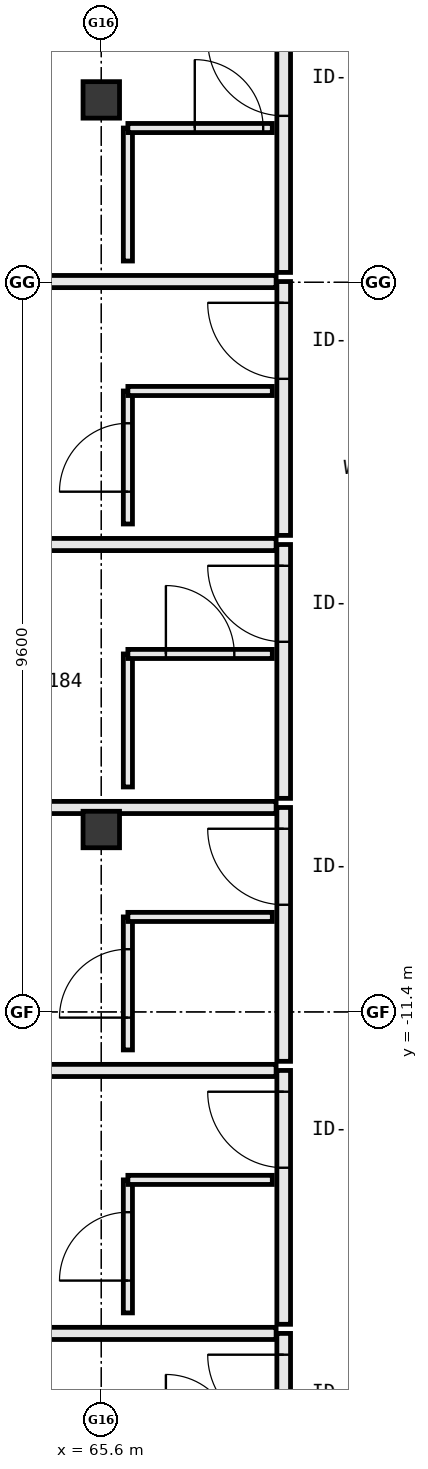
"""IFC4 building model, lengths in metres.
Left out: names, types, materials, properties, quantities, classifications, styles, units other than length and angle.
Written with IfcOpenShell. Run it as: python <this file> out.ifc"""

import sys

from ifc_helpers import new_model, si_unit, direction, frame, frame_2d, origin, origin_2d, place, context, subcontext, project, spatial, rectangle, extrude, element, fill, save


model = new_model("IFC4")
c1 = context("Model", 3, precision=1e-05, world=origin(), true_north=direction((0.0, 1.0)))
c2 = subcontext(c1, "Body", "Model", "MODEL_VIEW")
j1 = project(units=[si_unit("LENGTHUNIT", "METRE"), si_unit("PLANEANGLEUNIT", "RADIAN")], contexts=[c1])
p1 = place(None, origin())
s1 = spatial("IfcSite", under=j1, at=p1, CompositionType="ELEMENT")
p2 = place(p1, origin())
s2 = spatial("IfcBuilding", under=s1, at=p2, CompositionType="ELEMENT")
p3 = place(p2, frame((0.0, 0.0, 27.6)))
s3 = spatial("IfcBuildingStorey", under=s2, at=p3, CompositionType="ELEMENT", Elevation=27.6)
for number, where, z_axis, x_axis in (
    (1, (65.6, -9.0, 0.0), (0.0, 0.0, 1.0), (1.0, 0.0, 0.0)),
    (2, (65.6, 0.6, 0.0), (0.0, 0.0, 1.0), (1.0, 0.0, 0.0)),
):
    element("IfcColumn", number, at=place(p3, frame(where, z_axis=z_axis, x_axis=x_axis)), inside=s3, PredefinedType="COLUMN", context=c2, shape_type="SweptSolid", body=[
        extrude(rectangle(XDim=0.48, YDim=0.48, at=origin_2d()), origin(), (0.0, 0.0, 1.0), 3.8),
    ])
p4 = place(p3, frame((68.0, -18.97, 0.0), z_axis=(0.0, 0.0, 1.0), x_axis=(0.0, 1.0, 0.0)))
e3 = element("IfcWall", 3, at=p4, inside=s3, PredefinedType="PARTITIONING", context=c2, shape_type="SweptSolid", body=[
    extrude(rectangle(XDim=3.34, YDim=0.18, at=frame_2d((1.67, 0.0))), origin(), (0.0, 0.0, 1.0), 3.555),
])
p5 = place(p4, frame((2.06, 0.0, 0.0)))
e4 = element("IfcOpeningElement", 4, at=p5, cuts=e3, PredefinedType="OPENING", context=c2, shape_type="SweptSolid", body=[
    extrude(rectangle(XDim=1.0, YDim=2.2, at=frame_2d((0.5, 1.1))), frame((0.0, 0.102, 0.0), z_axis=(0.0, -1.0, 0.0), x_axis=(1.0, 0.0, 0.0)), (0.0, 0.0, 1.0), 0.204),
])
p6 = place(p3, frame((60.96, -15.63, 0.0), z_axis=(0.0, 0.0, 1.0), x_axis=(1.0, 0.0, 0.0)))
e5 = element("IfcWall", 5, at=p6, inside=s3, PredefinedType="PARTITIONING", context=c2, shape_type="SweptSolid", body=[
    extrude(rectangle(XDim=6.94, YDim=0.16, at=frame_2d((3.47, 0.0))), origin(), (0.0, 0.0, 1.0), 3.555),
])
p7 = place(p3, frame((68.0, -15.51, 0.0), z_axis=(0.0, 0.0, 1.0), x_axis=(0.0, 1.0, 0.0)))
e6 = element("IfcWall", 6, at=p7, inside=s3, PredefinedType="PARTITIONING", context=c2, shape_type="SweptSolid", body=[
    extrude(rectangle(XDim=3.34, YDim=0.18, at=frame_2d((1.67, 0.0))), origin(), (0.0, 0.0, 1.0), 3.555),
])
p8 = place(p7, frame((2.06, 0.0, 0.0)))
e7 = element("IfcOpeningElement", 7, at=p8, cuts=e6, PredefinedType="OPENING", context=c2, shape_type="SweptSolid", body=[
    extrude(rectangle(XDim=1.0, YDim=2.2, at=frame_2d((0.5, 1.1))), frame((0.0, 0.102, 0.0), z_axis=(0.0, -1.0, 0.0), x_axis=(1.0, 0.0, 0.0)), (0.0, 0.0, 1.0), 0.204),
])
p9 = place(p3, frame((60.96, -12.17, 0.0), z_axis=(0.0, 0.0, 1.0), x_axis=(1.0, 0.0, 0.0)))
e8 = element("IfcWall", 8, at=p9, inside=s3, PredefinedType="PARTITIONING", context=c2, shape_type="SweptSolid", body=[
    extrude(rectangle(XDim=6.94, YDim=0.16, at=frame_2d((3.47, 0.0))), origin(), (0.0, 0.0, 1.0), 3.555),
])
p10 = place(p3, frame((65.95, -15.36, 0.0), z_axis=(0.0, 0.0, 1.0), x_axis=(0.0, 1.0, 0.0)))
e9 = element("IfcWall", 9, at=p10, inside=s3, PredefinedType="PARTITIONING", context=c2, shape_type="SweptSolid", body=[
    extrude(rectangle(XDim=1.75, YDim=0.12, at=frame_2d((0.875, 0.0))), origin(), (0.0, 0.0, 1.0), 2.91),
])
p11 = place(p10, frame((0.425, 0.0, 0.0)))
e10 = element("IfcOpeningElement", 10, at=p11, cuts=e9, PredefinedType="OPENING", context=c2, shape_type="SweptSolid", body=[
    extrude(rectangle(XDim=0.9, YDim=2.15, at=frame_2d((0.45, 1.075))), frame((0.0, 0.072, 0.0), z_axis=(0.0, -1.0, 0.0), x_axis=(1.0, 0.0, 0.0)), (0.0, 0.0, 1.0), 0.144),
])
p12 = place(p3, frame((65.95, -13.61, 0.0), z_axis=(0.0, 0.0, 1.0), x_axis=(1.0, 0.0, 0.0)))
e11 = element("IfcWall", 11, at=p12, inside=s3, PredefinedType="PARTITIONING", context=c2, shape_type="SweptSolid", body=[
    extrude(rectangle(XDim=1.9, YDim=0.12, at=frame_2d((0.95, 0.0))), origin(), (0.0, 0.0, 1.0), 3.555),
])
p13 = place(p3, frame((68.0, -12.05, 0.0), z_axis=(0.0, 0.0, 1.0), x_axis=(0.0, 1.0, 0.0)))
e12 = element("IfcWall", 12, at=p13, inside=s3, PredefinedType="PARTITIONING", context=c2, shape_type="SweptSolid", body=[
    extrude(rectangle(XDim=3.34, YDim=0.18, at=frame_2d((1.67, 0.0))), origin(), (0.0, 0.0, 1.0), 3.555),
])
p14 = place(p13, frame((2.06, 0.0, 0.0)))
e13 = element("IfcOpeningElement", 13, at=p14, cuts=e12, PredefinedType="OPENING", context=c2, shape_type="SweptSolid", body=[
    extrude(rectangle(XDim=1.0, YDim=2.2, at=frame_2d((0.5, 1.1))), frame((0.0, 0.102, 0.0), z_axis=(0.0, -1.0, 0.0), x_axis=(1.0, 0.0, 0.0)), (0.0, 0.0, 1.0), 0.204),
])
p15 = place(p3, frame((60.96, -8.71, 0.0), z_axis=(0.0, 0.0, 1.0), x_axis=(1.0, 0.0, 0.0)))
e14 = element("IfcWall", 14, at=p15, inside=s3, PredefinedType="PARTITIONING", context=c2, shape_type="SweptSolid", body=[
    extrude(rectangle(XDim=6.94, YDim=0.16, at=frame_2d((3.47, 0.0))), origin(), (0.0, 0.0, 1.0), 3.01),
])
p16 = place(p3, frame((65.95, -11.9, 0.0), z_axis=(0.0, 0.0, 1.0), x_axis=(0.0, 1.0, 0.0)))
e15 = element("IfcWall", 15, at=p16, inside=s3, PredefinedType="PARTITIONING", context=c2, shape_type="SweptSolid", body=[
    extrude(rectangle(XDim=1.75, YDim=0.12, at=frame_2d((0.875, 0.0))), origin(), (0.0, 0.0, 1.0), 2.91),
])
p17 = place(p16, frame((0.425, 0.0, 0.0)))
e16 = element("IfcOpeningElement", 16, at=p17, cuts=e15, PredefinedType="OPENING", context=c2, shape_type="SweptSolid", body=[
    extrude(rectangle(XDim=0.9, YDim=2.15, at=frame_2d((0.45, 1.075))), frame((0.0, 0.072, 0.0), z_axis=(0.0, -1.0, 0.0), x_axis=(1.0, 0.0, 0.0)), (0.0, 0.0, 1.0), 0.144),
])
p18 = place(p3, frame((65.95, -10.15, 0.0), z_axis=(0.0, 0.0, 1.0), x_axis=(1.0, 0.0, 0.0)))
e17 = element("IfcWall", 17, at=p18, inside=s3, PredefinedType="PARTITIONING", context=c2, shape_type="SweptSolid", body=[
    extrude(rectangle(XDim=1.9, YDim=0.12, at=frame_2d((0.95, 0.0))), origin(), (0.0, 0.0, 1.0), 3.555),
])
p19 = place(p3, frame((68.0, -8.59, 0.0), z_axis=(0.0, 0.0, 1.0), x_axis=(0.0, 1.0, 0.0)))
e18 = element("IfcWall", 18, at=p19, inside=s3, PredefinedType="PARTITIONING", context=c2, shape_type="SweptSolid", body=[
    extrude(rectangle(XDim=3.34, YDim=0.18, at=frame_2d((1.67, 0.0))), origin(), (0.0, 0.0, 1.0), 3.555),
])
p20 = place(p19, frame((2.06, 0.0, 0.0)))
e19 = element("IfcOpeningElement", 19, at=p20, cuts=e18, PredefinedType="OPENING", context=c2, shape_type="SweptSolid", body=[
    extrude(rectangle(XDim=1.0, YDim=2.2, at=frame_2d((0.5, 1.1))), frame((0.0, 0.102, 0.0), z_axis=(0.0, -1.0, 0.0), x_axis=(1.0, 0.0, 0.0)), (0.0, 0.0, 1.0), 0.204),
])
p21 = place(p3, frame((60.96, -5.25, 0.0), z_axis=(0.0, 0.0, 1.0), x_axis=(1.0, 0.0, 0.0)))
e20 = element("IfcWall", 20, at=p21, inside=s3, PredefinedType="PARTITIONING", context=c2, shape_type="SweptSolid", body=[
    extrude(rectangle(XDim=6.94, YDim=0.16, at=frame_2d((3.47, 0.0))), origin(), (0.0, 0.0, 1.0), 3.555),
])
p22 = place(p3, frame((65.95, -8.44, 0.0), z_axis=(0.0, 0.0, 1.0), x_axis=(0.0, 1.0, 0.0)))
e21 = element("IfcWall", 21, at=p22, inside=s3, PredefinedType="PARTITIONING", context=c2, shape_type="SweptSolid", body=[
    extrude(rectangle(XDim=1.75, YDim=0.12, at=frame_2d((0.875, 0.0))), origin(), (0.0, 0.0, 1.0), 2.91),
])
p23 = place(p3, frame((65.95, -6.69, 0.0), z_axis=(0.0, 0.0, 1.0), x_axis=(1.0, 0.0, 0.0)))
e22 = element("IfcWall", 22, at=p23, inside=s3, PredefinedType="PARTITIONING", context=c2, shape_type="SweptSolid", body=[
    extrude(rectangle(XDim=1.9, YDim=0.12, at=frame_2d((0.95, 0.0))), origin(), (0.0, 0.0, 1.0), 3.555),
])
p24 = place(p23, frame((0.5, 0.0, 0.0)))
e23 = element("IfcOpeningElement", 23, at=p24, cuts=e22, PredefinedType="OPENING", context=c2, shape_type="SweptSolid", body=[
    extrude(rectangle(XDim=0.9, YDim=2.15, at=frame_2d((0.45, 1.075))), frame((0.0, 0.072, 0.0), z_axis=(0.0, -1.0, 0.0), x_axis=(1.0, 0.0, 0.0)), (0.0, 0.0, 1.0), 0.144),
])
p25 = place(p3, frame((68.0, -5.13, 0.0), z_axis=(0.0, 0.0, 1.0), x_axis=(0.0, 1.0, 0.0)))
e24 = element("IfcWall", 24, at=p25, inside=s3, PredefinedType="PARTITIONING", context=c2, shape_type="SweptSolid", body=[
    extrude(rectangle(XDim=3.34, YDim=0.18, at=frame_2d((1.67, 0.0))), origin(), (0.0, 0.0, 1.0), 3.555),
])
p26 = place(p25, frame((2.06, 0.0, 0.0)))
e25 = element("IfcOpeningElement", 25, at=p26, cuts=e24, PredefinedType="OPENING", context=c2, shape_type="SweptSolid", body=[
    extrude(rectangle(XDim=1.0, YDim=2.2, at=frame_2d((0.5, 1.1))), frame((0.0, 0.102, 0.0), z_axis=(0.0, -1.0, 0.0), x_axis=(1.0, 0.0, 0.0)), (0.0, 0.0, 1.0), 0.204),
])
p27 = place(p3, frame((60.96, -1.79, 0.0), z_axis=(0.0, 0.0, 1.0), x_axis=(1.0, 0.0, 0.0)))
e26 = element("IfcWall", 26, at=p27, inside=s3, PredefinedType="PARTITIONING", context=c2, shape_type="SweptSolid", body=[
    extrude(rectangle(XDim=6.94, YDim=0.16, at=frame_2d((3.47, 0.0))), origin(), (0.0, 0.0, 1.0), 3.555),
])
p28 = place(p3, frame((65.95, -4.98, 0.0), z_axis=(0.0, 0.0, 1.0), x_axis=(0.0, 1.0, 0.0)))
e27 = element("IfcWall", 27, at=p28, inside=s3, PredefinedType="PARTITIONING", context=c2, shape_type="SweptSolid", body=[
    extrude(rectangle(XDim=1.75, YDim=0.12, at=frame_2d((0.875, 0.0))), origin(), (0.0, 0.0, 1.0), 2.91),
])
p29 = place(p28, frame((0.425, 0.0, 0.0)))
e28 = element("IfcOpeningElement", 28, at=p29, cuts=e27, PredefinedType="OPENING", context=c2, shape_type="SweptSolid", body=[
    extrude(rectangle(XDim=0.9, YDim=2.15, at=frame_2d((0.45, 1.075))), frame((0.0, 0.072, 0.0), z_axis=(0.0, -1.0, 0.0), x_axis=(1.0, 0.0, 0.0)), (0.0, 0.0, 1.0), 0.144),
])
p30 = place(p3, frame((65.95, -3.23, 0.0), z_axis=(0.0, 0.0, 1.0), x_axis=(1.0, 0.0, 0.0)))
e29 = element("IfcWall", 29, at=p30, inside=s3, PredefinedType="PARTITIONING", context=c2, shape_type="SweptSolid", body=[
    extrude(rectangle(XDim=1.9, YDim=0.12, at=frame_2d((0.95, 0.0))), origin(), (0.0, 0.0, 1.0), 3.555),
])
p31 = place(p3, frame((68.0, -1.67, 0.0), z_axis=(0.0, 0.0, 1.0), x_axis=(0.0, 1.0, 0.0)))
e30 = element("IfcWall", 30, at=p31, inside=s3, PredefinedType="PARTITIONING", context=c2, shape_type="SweptSolid", body=[
    extrude(rectangle(XDim=3.34, YDim=0.18, at=frame_2d((1.67, 0.0))), origin(), (0.0, 0.0, 1.0), 3.555),
])
p32 = place(p31, frame((2.06, 0.0, 0.0)))
e31 = element("IfcOpeningElement", 31, at=p32, cuts=e30, PredefinedType="OPENING", context=c2, shape_type="SweptSolid", body=[
    extrude(rectangle(XDim=1.0, YDim=2.2, at=frame_2d((0.5, 1.1))), frame((0.0, 0.102, 0.0), z_axis=(0.0, -1.0, 0.0), x_axis=(1.0, 0.0, 0.0)), (0.0, 0.0, 1.0), 0.204),
])
p33 = place(p3, frame((65.95, -1.52, 0.0), z_axis=(0.0, 0.0, 1.0), x_axis=(0.0, 1.0, 0.0)))
e32 = element("IfcWall", 32, at=p33, inside=s3, PredefinedType="PARTITIONING", context=c2, shape_type="SweptSolid", body=[
    extrude(rectangle(XDim=1.75, YDim=0.12, at=frame_2d((0.875, 0.0))), origin(), (0.0, 0.0, 1.0), 2.91),
])
p34 = place(p3, frame((65.95, 0.23, 0.0), z_axis=(0.0, 0.0, 1.0), x_axis=(1.0, 0.0, 0.0)))
e33 = element("IfcWall", 33, at=p34, inside=s3, PredefinedType="PARTITIONING", context=c2, shape_type="SweptSolid", body=[
    extrude(rectangle(XDim=1.9, YDim=0.12, at=frame_2d((0.95, 0.0))), origin(), (0.0, 0.0, 1.0), 2.93),
])
p35 = place(p34, frame((0.88, 0.0, 0.0)))
e34 = element("IfcOpeningElement", 34, at=p35, cuts=e33, PredefinedType="OPENING", context=c2, shape_type="SweptSolid", body=[
    extrude(rectangle(XDim=0.9, YDim=2.15, at=frame_2d((0.45, 1.075))), frame((0.0, 0.072, 0.0), z_axis=(0.0, -1.0, 0.0), x_axis=(1.0, 0.0, 0.0)), (0.0, 0.0, 1.0), 0.144),
])
p36 = place(p5, origin())
e35 = element("IfcDoor", 35, at=p36, inside=s3, OperationType="SINGLE_SWING_RIGHT", PredefinedType="DOOR", context=c2, shape_type="SweptSolid", body=[
    extrude(rectangle(XDim=1.0, YDim=2.2, at=frame_2d((0.5, 1.1))), frame((0.0, 0.025, 0.0), z_axis=(0.0, -1.0, 0.0), x_axis=(1.0, 0.0, 0.0)), (0.0, 0.0, 1.0), 0.05),
])
fill(e4, e35)
p37 = place(p8, origin())
e36 = element("IfcDoor", 36, at=p37, inside=s3, OperationType="SINGLE_SWING_RIGHT", PredefinedType="DOOR", context=c2, shape_type="SweptSolid", body=[
    extrude(rectangle(XDim=1.0, YDim=2.2, at=frame_2d((0.5, 1.1))), frame((0.0, 0.025, 0.0), z_axis=(0.0, -1.0, 0.0), x_axis=(1.0, 0.0, 0.0)), (0.0, 0.0, 1.0), 0.05),
])
fill(e7, e36)
p38 = place(p11, origin())
e37 = element("IfcDoor", 37, at=p38, inside=s3, OperationType="SINGLE_SWING_LEFT", PredefinedType="DOOR", context=c2, shape_type="SweptSolid", body=[
    extrude(rectangle(XDim=0.9, YDim=2.15, at=frame_2d((0.45, 1.075))), frame((0.0, 0.025, 0.0), z_axis=(0.0, -1.0, 0.0), x_axis=(1.0, 0.0, 0.0)), (0.0, 0.0, 1.0), 0.05),
])
fill(e10, e37)
p39 = place(p14, origin())
e38 = element("IfcDoor", 38, at=p39, inside=s3, OperationType="SINGLE_SWING_RIGHT", PredefinedType="DOOR", context=c2, shape_type="SweptSolid", body=[
    extrude(rectangle(XDim=1.0, YDim=2.2, at=frame_2d((0.5, 1.1))), frame((0.0, 0.025, 0.0), z_axis=(0.0, -1.0, 0.0), x_axis=(1.0, 0.0, 0.0)), (0.0, 0.0, 1.0), 0.05),
])
fill(e13, e38)
p40 = place(p17, origin())
e39 = element("IfcDoor", 39, at=p40, inside=s3, OperationType="SINGLE_SWING_LEFT", PredefinedType="DOOR", context=c2, shape_type="SweptSolid", body=[
    extrude(rectangle(XDim=0.9, YDim=2.15, at=frame_2d((0.45, 1.075))), frame((0.0, 0.025, 0.0), z_axis=(0.0, -1.0, 0.0), x_axis=(1.0, 0.0, 0.0)), (0.0, 0.0, 1.0), 0.05),
])
fill(e16, e39)
p41 = place(p20, origin())
e40 = element("IfcDoor", 40, at=p41, inside=s3, OperationType="SINGLE_SWING_RIGHT", PredefinedType="DOOR", context=c2, shape_type="SweptSolid", body=[
    extrude(rectangle(XDim=1.0, YDim=2.2, at=frame_2d((0.5, 1.1))), frame((0.0, 0.025, 0.0), z_axis=(0.0, -1.0, 0.0), x_axis=(1.0, 0.0, 0.0)), (0.0, 0.0, 1.0), 0.05),
])
fill(e19, e40)
p42 = place(p24, origin())
e41 = element("IfcDoor", 41, at=p42, inside=s3, OperationType="SINGLE_SWING_LEFT", PredefinedType="DOOR", context=c2, shape_type="SweptSolid", body=[
    extrude(rectangle(XDim=0.9, YDim=2.15, at=frame_2d((0.45, 1.075))), frame((0.0, 0.025, 0.0), z_axis=(0.0, -1.0, 0.0), x_axis=(1.0, 0.0, 0.0)), (0.0, 0.0, 1.0), 0.05),
])
fill(e23, e41)
p43 = place(p26, origin())
e42 = element("IfcDoor", 42, at=p43, inside=s3, OperationType="SINGLE_SWING_RIGHT", PredefinedType="DOOR", context=c2, shape_type="SweptSolid", body=[
    extrude(rectangle(XDim=1.0, YDim=2.2, at=frame_2d((0.5, 1.1))), frame((0.0, 0.025, 0.0), z_axis=(0.0, -1.0, 0.0), x_axis=(1.0, 0.0, 0.0)), (0.0, 0.0, 1.0), 0.05),
])
fill(e25, e42)
p44 = place(p29, origin())
e43 = element("IfcDoor", 43, at=p44, inside=s3, OperationType="SINGLE_SWING_LEFT", PredefinedType="DOOR", context=c2, shape_type="SweptSolid", body=[
    extrude(rectangle(XDim=0.9, YDim=2.15, at=frame_2d((0.45, 1.075))), frame((0.0, 0.025, 0.0), z_axis=(0.0, -1.0, 0.0), x_axis=(1.0, 0.0, 0.0)), (0.0, 0.0, 1.0), 0.05),
])
fill(e28, e43)
p45 = place(p32, origin())
e44 = element("IfcDoor", 44, at=p45, inside=s3, OperationType="SINGLE_SWING_RIGHT", PredefinedType="DOOR", context=c2, shape_type="SweptSolid", body=[
    extrude(rectangle(XDim=1.0, YDim=2.2, at=frame_2d((0.5, 1.1))), frame((0.0, 0.025, 0.0), z_axis=(0.0, -1.0, 0.0), x_axis=(1.0, 0.0, 0.0)), (0.0, 0.0, 1.0), 0.05),
])
fill(e31, e44)
p46 = place(p35, origin())
e45 = element("IfcDoor", 45, at=p46, inside=s3, OperationType="SINGLE_SWING_LEFT", PredefinedType="DOOR", context=c2, shape_type="SweptSolid", body=[
    extrude(rectangle(XDim=0.9, YDim=2.15, at=frame_2d((0.45, 1.075))), frame((0.0, 0.025, 0.0), z_axis=(0.0, -1.0, 0.0), x_axis=(1.0, 0.0, 0.0)), (0.0, 0.0, 1.0), 0.05),
])
fill(e34, e45)
save(model, sys.argv[1])
